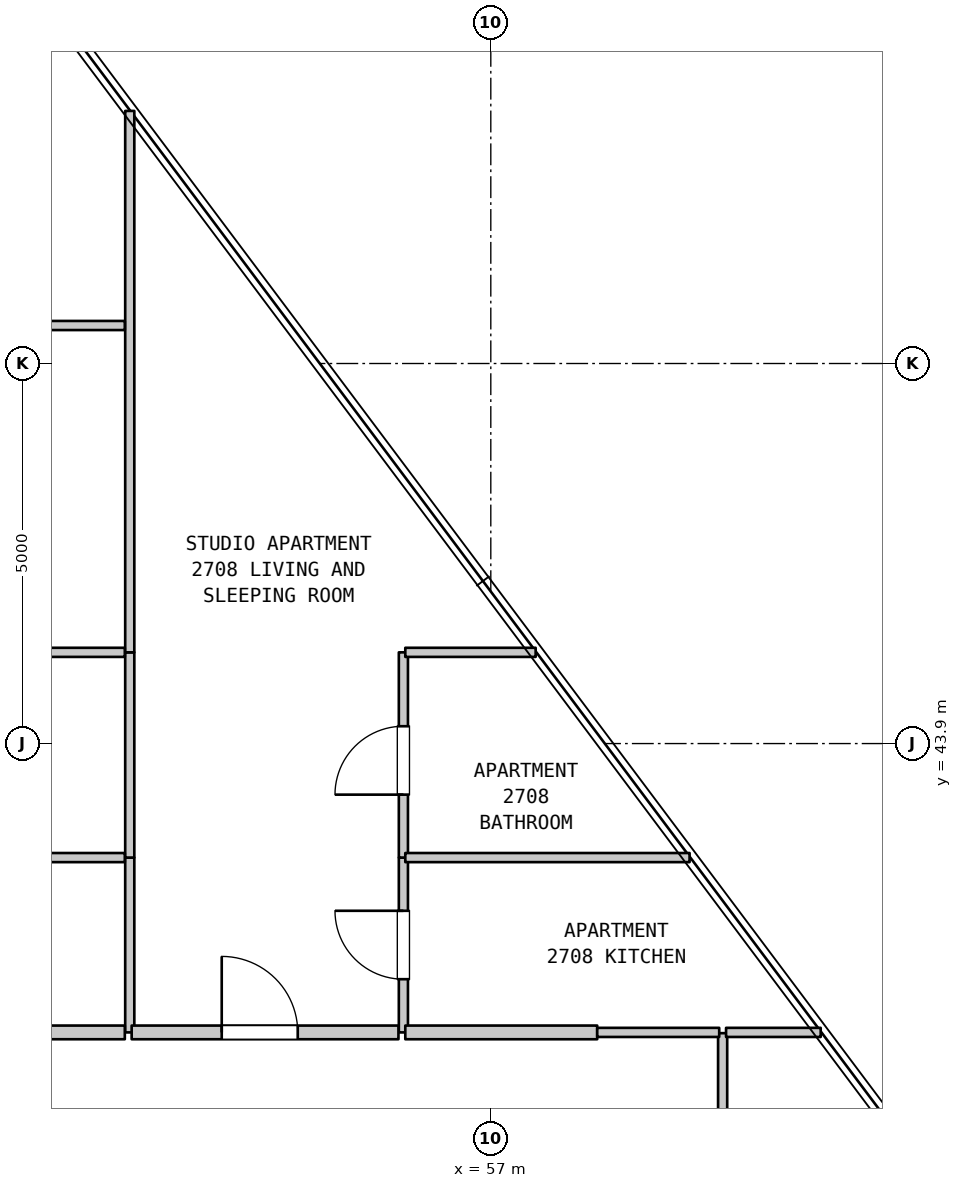
"""IFC4 building model, lengths in metres.
Left out: names, types, materials, properties, quantities, classifications, styles, units other than length and angle.
Written with IfcOpenShell. Run it as: python <this file> out.ifc"""

import sys

from ifc_helpers import new_model, si_unit, direction, frame, frame_2d, origin, place, context, subcontext, project, spatial, rectangle, extrude, element, fill, save


model = new_model("IFC4")
c1 = context("Model", 3, precision=1e-05, world=origin(), true_north=direction((0.0, 1.0)))
c2 = subcontext(c1, "Body", "Model", "MODEL_VIEW")
j1 = project(units=[si_unit("LENGTHUNIT", "METRE"), si_unit("PLANEANGLEUNIT", "RADIAN")], contexts=[c1])
p1 = place(None, origin())
s1 = spatial("IfcSite", under=j1, at=p1, CompositionType="ELEMENT")
p2 = place(p1, origin())
s2 = spatial("IfcBuilding", under=s1, at=p2, CompositionType="ELEMENT")
p3 = place(p2, frame((0.0, 0.0, 113.1)))
s3 = spatial("IfcBuildingStorey", under=s2, at=p3, CompositionType="ELEMENT", Elevation=113.1)
p4 = place(p3, frame((52.25, 40.1, 0.0), z_axis=(0.0, 0.0, 1.0), x_axis=(0.0, 1.0, 0.0)))
e1 = element("IfcWall", 1, at=p4, inside=s3, PredefinedType="PARTITIONING", context=c2, shape_type="SweptSolid", body=[
    extrude(rectangle(XDim=2.3, YDim=0.12, at=frame_2d((1.15, 0.0))), origin(), (0.0, 0.0, 1.0), 3.385),
])
p5 = place(p3, frame((52.25, 42.4, 0.0), z_axis=(0.0, 0.0, 1.0), x_axis=(0.0, 1.0, 0.0)))
e2 = element("IfcWall", 2, at=p5, inside=s3, PredefinedType="PARTITIONING", context=c2, shape_type="SweptSolid", body=[
    extrude(rectangle(XDim=2.7, YDim=0.12, at=frame_2d((1.35, 0.0))), origin(), (0.0, 0.0, 1.0), 3.385),
])
p6 = place(p3, frame((52.25, 45.1, 0.0), z_axis=(0.0, 0.0, 1.0), x_axis=(0.0, 1.0, 0.0)))
e3 = element("IfcWall", 3, at=p6, inside=s3, PredefinedType="PARTITIONING", context=c2, shape_type="SweptSolid", body=[
    extrude(rectangle(XDim=7.123, YDim=0.12, at=frame_2d((3.562, 0.0))), origin(), (0.0, 0.0, 1.0), 3.385),
])
p7 = place(p3, frame((55.85, 40.1, 0.0), z_axis=(0.0, 0.0, 1.0), x_axis=(0.0, 1.0, 0.0)))
e4 = element("IfcWall", 4, at=p7, inside=s3, PredefinedType="PARTITIONING", context=c2, shape_type="SweptSolid", body=[
    extrude(rectangle(XDim=2.3, YDim=0.12, at=frame_2d((1.15, 0.0))), origin(), (0.0, 0.0, 1.0), 3.385),
])
p8 = place(p7, frame((0.7, 0.0, 0.0)))
e5 = element("IfcOpeningElement", 5, at=p8, cuts=e4, PredefinedType="OPENING", context=c2, shape_type="SweptSolid", body=[
    extrude(rectangle(XDim=0.9, YDim=2.15, at=frame_2d((0.45, 1.075))), frame((0.0, 0.07, 0.0), z_axis=(0.0, -1.0, 0.0), x_axis=(1.0, 0.0, 0.0)), (0.0, 0.0, 1.0), 0.14),
])
p9 = place(p3, frame((55.85, 42.4, 0.0), z_axis=(0.0, 0.0, 1.0), x_axis=(0.0, 1.0, 0.0)))
e6 = element("IfcWall", 6, at=p9, inside=s3, PredefinedType="PARTITIONING", context=c2, shape_type="SweptSolid", body=[
    extrude(rectangle(XDim=2.7, YDim=0.12, at=frame_2d((1.35, 0.0))), origin(), (0.0, 0.0, 1.0), 3.385),
])
p10 = place(p9, frame((0.828, 0.0, 0.0)))
e7 = element("IfcOpeningElement", 7, at=p10, cuts=e6, PredefinedType="OPENING", context=c2, shape_type="SweptSolid", body=[
    extrude(rectangle(XDim=0.9, YDim=2.1, at=frame_2d((0.45, 1.05))), frame((0.0, 0.07, 0.0), z_axis=(0.0, -1.0, 0.0), x_axis=(1.0, 0.0, 0.0)), (0.0, 0.0, 1.0), 0.14),
])
p11 = place(p3, frame((60.05, 37.89, 0.0), z_axis=(0.0, 0.0, 1.0), x_axis=(0.0, 1.0, 0.0)))
e8 = element("IfcWall", 8, at=p11, inside=s3, PredefinedType="PARTITIONING", context=c2, shape_type="SweptSolid", body=[
    extrude(rectangle(XDim=2.2, YDim=0.12, at=frame_2d((1.1, 0.0))), origin(), (0.0, 0.0, 1.0), 3.385),
])
p12 = place(p3, frame((46.845, 40.1, 0.0), z_axis=(0.0, 0.0, 1.0), x_axis=(1.0, 0.0, 0.0)))
e9 = element("IfcWall", 9, at=p12, inside=s3, PredefinedType="STANDARD", context=c2, shape_type="SweptSolid", body=[
    extrude(rectangle(XDim=5.34, YDim=0.18, at=frame_2d((2.67, 0.0))), origin(), (0.0, 0.0, 1.0), 3.385),
])
p13 = place(p3, frame((52.275, 40.1, 0.0), z_axis=(0.0, 0.0, 1.0), x_axis=(1.0, 0.0, 0.0)))
e10 = element("IfcWall", 10, at=p13, inside=s3, PredefinedType="STANDARD", context=c2, shape_type="SweptSolid", body=[
    extrude(rectangle(XDim=3.51, YDim=0.18, at=frame_2d((1.755, 0.0))), origin(), (0.0, 0.0, 1.0), 3.385),
])
p14 = place(p13, frame((1.185, 0.0, 0.0)))
e11 = element("IfcOpeningElement", 11, at=p14, cuts=e10, PredefinedType="OPENING", context=c2, shape_type="SweptSolid", body=[
    extrude(rectangle(XDim=1.0, YDim=2.15, at=frame_2d((0.5, 1.075))), frame((0.0, 0.1, 0.0), z_axis=(0.0, -1.0, 0.0), x_axis=(1.0, 0.0, 0.0)), (0.0, 0.0, 1.0), 0.2),
])
p15 = place(p3, frame((55.875, 40.1, 0.0), z_axis=(0.0, 0.0, 1.0), x_axis=(1.0, 0.0, 0.0)))
e12 = element("IfcWall", 12, at=p15, inside=s3, PredefinedType="STANDARD", context=c2, shape_type="SweptSolid", body=[
    extrude(rectangle(XDim=2.525, YDim=0.18, at=frame_2d((1.262, 0.0))), origin(), (0.0, 0.0, 1.0), 3.385),
])
p16 = place(p3, frame((58.4, 40.1, 0.0), z_axis=(0.0, 0.0, 1.0), x_axis=(1.0, 0.0, 0.0)))
e13 = element("IfcWall", 13, at=p16, inside=s3, PredefinedType="PARTITIONING", context=c2, shape_type="SweptSolid", body=[
    extrude(rectangle(XDim=1.605, YDim=0.12, at=frame_2d((0.802, 0.0))), origin(), (0.0, 0.0, 1.0), 3.385),
])
p17 = place(p3, frame((60.095, 40.1, 0.0), z_axis=(0.0, 0.0, 1.0), x_axis=(1.0, 0.0, 0.0)))
e14 = element("IfcWall", 14, at=p17, inside=s3, PredefinedType="PARTITIONING", context=c2, shape_type="SweptSolid", body=[
    extrude(rectangle(XDim=1.245, YDim=0.12, at=frame_2d((0.623, 0.0))), origin(), (0.0, 0.0, 1.0), 3.385),
])
p18 = place(p3, frame((46.845, 42.4, 0.0), z_axis=(0.0, 0.0, 1.0), x_axis=(1.0, 0.0, 0.0)))
e15 = element("IfcWall", 15, at=p18, inside=s3, PredefinedType="PARTITIONING", context=c2, shape_type="SweptSolid", body=[
    extrude(rectangle(XDim=5.34, YDim=0.12, at=frame_2d((2.67, 0.0))), origin(), (0.0, 0.0, 1.0), 3.385),
])
p19 = place(p3, frame((55.875, 42.4, 0.0), z_axis=(0.0, 0.0, 1.0), x_axis=(1.0, 0.0, 0.0)))
e16 = element("IfcWall", 16, at=p19, inside=s3, PredefinedType="PARTITIONING", context=c2, shape_type="SweptSolid", body=[
    extrude(rectangle(XDim=3.74, YDim=0.12, at=frame_2d((1.87, 0.0))), origin(), (0.0, 0.0, 1.0), 3.385),
])
p20 = place(p3, frame((46.845, 45.1, 0.0), z_axis=(0.0, 0.0, 1.0), x_axis=(1.0, 0.0, 0.0)))
e17 = element("IfcWall", 17, at=p20, inside=s3, PredefinedType="PARTITIONING", context=c2, shape_type="SweptSolid", body=[
    extrude(rectangle(XDim=5.34, YDim=0.12, at=frame_2d((2.67, 0.0))), origin(), (0.0, 0.0, 1.0), 3.385),
])
p21 = place(p3, frame((55.875, 45.1, 0.0), z_axis=(0.0, 0.0, 1.0), x_axis=(1.0, 0.0, 0.0)))
e18 = element("IfcWall", 18, at=p21, inside=s3, PredefinedType="PARTITIONING", context=c2, shape_type="SweptSolid", body=[
    extrude(rectangle(XDim=1.715, YDim=0.12, at=frame_2d((0.857, 0.0))), origin(), (0.0, 0.0, 1.0), 3.385),
])
p22 = place(p3, frame((46.845, 49.4, 0.0), z_axis=(0.0, 0.0, 1.0), x_axis=(1.0, 0.0, 0.0)))
e19 = element("IfcWall", 19, at=p22, inside=s3, PredefinedType="PARTITIONING", context=c2, shape_type="SweptSolid", body=[
    extrude(rectangle(XDim=5.34, YDim=0.12, at=frame_2d((2.67, 0.0))), origin(), (0.0, 0.0, 1.0), 3.385),
])
p23 = place(p8, origin())
e20 = element("IfcDoor", 20, at=p23, inside=s3, OperationType="SINGLE_SWING_RIGHT", PredefinedType="DOOR", context=c2, shape_type="SweptSolid", body=[
    extrude(rectangle(XDim=0.9, YDim=2.15, at=frame_2d((0.45, 1.075))), frame((0.0, 0.025, 0.0), z_axis=(0.0, -1.0, 0.0), x_axis=(1.0, 0.0, 0.0)), (0.0, 0.0, 1.0), 0.05),
])
fill(e5, e20)
p24 = place(p10, origin())
e21 = element("IfcDoor", 21, at=p24, inside=s3, OperationType="SINGLE_SWING_LEFT", PredefinedType="DOOR", context=c2, shape_type="SweptSolid", body=[
    extrude(rectangle(XDim=0.9, YDim=2.1, at=frame_2d((0.45, 1.05))), frame((0.0, 0.025, 0.0), z_axis=(0.0, -1.0, 0.0), x_axis=(1.0, 0.0, 0.0)), (0.0, 0.0, 1.0), 0.05),
])
fill(e7, e21)
p25 = place(p14, origin())
e22 = element("IfcDoor", 22, at=p25, inside=s3, OperationType="SINGLE_SWING_LEFT", PredefinedType="DOOR", context=c2, shape_type="SweptSolid", body=[
    extrude(rectangle(XDim=1.0, YDim=2.15, at=frame_2d((0.5, 1.075))), frame((0.0, 0.025, 0.0), z_axis=(0.0, -1.0, 0.0), x_axis=(1.0, 0.0, 0.0)), (0.0, 0.0, 1.0), 0.05),
])
fill(e11, e22)
save(model, sys.argv[1])
